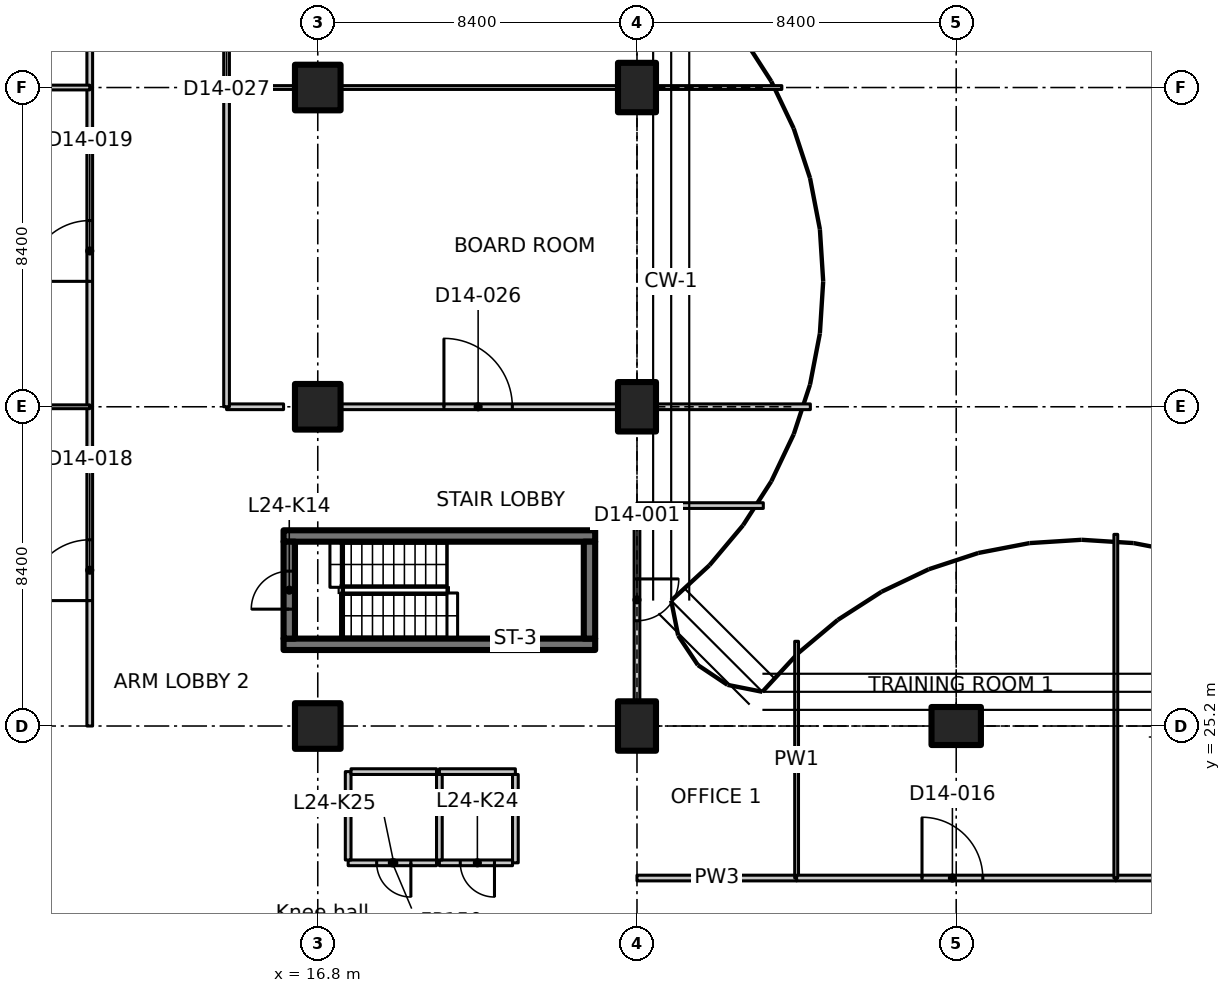
"""IFC4 building model, lengths in metres.
Left out: names, types, materials, properties, quantities, classifications, styles, units other than length and angle.
Written with IfcOpenShell. Run it as: python <this file> out.ifc"""

import sys

from ifc_helpers import new_model, si_unit, direction, frame, frame_2d, origin, origin_2d, place, context, subcontext, project, spatial, polyline, rectangle, outline, extrude, element, fill, save


model = new_model("IFC4")
c1 = context("Model", 3, precision=1e-05, world=origin(), true_north=direction((0.0, 1.0)))
c2 = subcontext(c1, "Body", "Model", "MODEL_VIEW")
j1 = project(units=[si_unit("LENGTHUNIT", "METRE"), si_unit("PLANEANGLEUNIT", "RADIAN")], contexts=[c1])
p1 = place(None, origin())
s1 = spatial("IfcSite", under=j1, at=p1, CompositionType="ELEMENT")
p2 = place(p1, origin())
s2 = spatial("IfcBuilding", under=s1, at=p2, CompositionType="ELEMENT")
p3 = place(p2, frame((0.0, 0.0, 102.5)))
s3 = spatial("IfcBuildingStorey", under=s2, at=p3, CompositionType="ELEMENT", Elevation=102.5)
for number, where, z_axis, x_axis in (
    (1, (16.8, 25.2, 0.0), (0.0, 0.0, 1.0), (1.0, 0.0, 0.0)),
    (2, (16.8, 33.6, 0.0), (0.0, 0.0, 1.0), (1.0, 0.0, 0.0)),
    (3, (16.8, 42.0, 0.0), (0.0, 0.0, 1.0), (1.0, 0.0, 0.0)),
):
    element("IfcColumn", number, at=place(p3, frame(where, z_axis=z_axis, x_axis=x_axis)), inside=s3, PredefinedType="COLUMN", context=c2, shape_type="SweptSolid", body=[
        extrude(rectangle(XDim=1.2, YDim=1.2, at=origin_2d()), origin(), (0.0, 0.0, 1.0), 3.35),
    ])
for number, where, z_axis, x_axis in (
    (4, (25.2, 25.2, 0.0), (0.0, 0.0, 1.0), (1.0, 0.0, 0.0)),
    (5, (25.2, 33.6, 0.0), (0.0, 0.0, 1.0), (1.0, 0.0, 0.0)),
    (6, (25.2, 42.0, 0.0), (0.0, 0.0, 1.0), (1.0, 0.0, 0.0)),
    (7, (33.6, 25.2, 0.0), (0.0, 0.0, 1.0), (0.0, 1.0, 0.0)),
):
    element("IfcColumn", number, at=place(p3, frame(where, z_axis=z_axis, x_axis=x_axis)), inside=s3, PredefinedType="COLUMN", context=c2, shape_type="SweptSolid", body=[
        extrude(rectangle(XDim=1.0, YDim=1.3, at=origin_2d()), origin(), (0.0, 0.0, 1.0), 3.35),
    ])
for number, where, z_axis, x_axis in (
    (8, (15.9, 27.35, 0.0), (0.0, 0.0, 1.0), (1.0, 0.0, 0.0)),
    (9, (15.9, 30.2, 0.0), (0.0, 0.0, 1.0), (1.0, 0.0, 0.0)),
):
    element("IfcWall", number, at=place(p3, frame(where, z_axis=z_axis, x_axis=x_axis)), inside=s3, PredefinedType="SHEAR", context=c2, shape_type="SweptSolid", body=[
        extrude(rectangle(XDim=8.2, YDim=0.3, at=frame_2d((4.1, 0.0))), origin(), (0.0, 0.0, 1.0), 3.35),
    ])
p4 = place(p3, frame((16.05, 27.5, 0.0), z_axis=(0.0, 0.0, 1.0), x_axis=(0.0, 1.0, 0.0)))
e10 = element("IfcWall", 10, at=p4, inside=s3, PredefinedType="SHEAR", context=c2, shape_type="SweptSolid", body=[
    extrude(rectangle(XDim=2.55, YDim=0.3, at=frame_2d((1.275, 0.0))), origin(), (0.0, 0.0, 1.0), 3.35),
])
p5 = place(p4, frame((0.775, 0.0, 0.0)))
e11 = element("IfcOpeningElement", 11, at=p5, cuts=e10, PredefinedType="OPENING", context=c2, shape_type="SweptSolid", body=[
    extrude(rectangle(XDim=1.0, YDim=2.1, at=frame_2d((0.5, 1.05))), frame((0.0, 0.16, 0.0), z_axis=(0.0, -1.0, 0.0), x_axis=(1.0, 0.0, 0.0)), (0.0, 0.0, 1.0), 0.32),
])
p6 = place(p3, frame((23.95, 27.5, 0.0), z_axis=(0.0, 0.0, 1.0), x_axis=(0.0, 1.0, 0.0)))
e12 = element("IfcWall", 12, at=p6, inside=s3, PredefinedType="SHEAR", context=c2, shape_type="SweptSolid", body=[
    extrude(rectangle(XDim=2.55, YDim=0.3, at=frame_2d((1.275, 0.0))), origin(), (0.0, 0.0, 1.0), 3.35),
])
p7 = place(p3, frame((20.0, 24.0, 0.0), z_axis=(0.0, 0.0, 1.0), x_axis=(1.0, 0.0, 0.0)))
e13 = element("IfcWall", 13, at=p7, inside=s3, PredefinedType="PARTITIONING", context=c2, shape_type="SweptSolid", body=[
    extrude(rectangle(XDim=2.0, YDim=0.15, at=frame_2d((1.0, 0.0))), origin(), (0.0, 0.0, 1.0), 3.35),
])
p8 = place(p3, frame((22.0, 23.925, 0.0), z_axis=(0.0, 0.0, 1.0), x_axis=(0.0, -1.0, 0.0)))
e14 = element("IfcWall", 14, at=p8, inside=s3, PredefinedType="PARTITIONING", context=c2, shape_type="SweptSolid", body=[
    extrude(rectangle(XDim=2.325, YDim=0.15, at=frame_2d((1.163, 0.0))), origin(), (0.0, 0.0, 1.0), 3.35),
])
p9 = place(p3, frame((21.925, 21.6, 0.0), z_axis=(0.0, 0.0, 1.0), x_axis=(-1.0, 0.0, 0.0)))
e15 = element("IfcWall", 15, at=p9, inside=s3, PredefinedType="PARTITIONING", context=c2, shape_type="SweptSolid", body=[
    extrude(rectangle(XDim=1.925, YDim=0.15, at=frame_2d((0.962, 0.0))), origin(), (0.0, 0.0, 1.0), 3.35),
])
p10 = place(p9, frame((0.475, 0.0, 0.0)))
e16 = element("IfcOpeningElement", 16, at=p10, cuts=e15, PredefinedType="OPENING", context=c2, shape_type="SweptSolid", body=[
    extrude(rectangle(XDim=0.9, YDim=2.1, at=frame_2d((0.45, 1.05))), frame((0.0, 0.085, 0.0), z_axis=(0.0, -1.0, 0.0), x_axis=(1.0, 0.0, 0.0)), (0.0, 0.0, 1.0), 0.17),
])
p11 = place(p3, frame((20.0, 21.675, 0.0), z_axis=(0.0, 0.0, 1.0), x_axis=(0.0, 1.0, 0.0)))
e17 = element("IfcWall", 17, at=p11, inside=s3, PredefinedType="PARTITIONING", context=c2, shape_type="SweptSolid", body=[
    extrude(rectangle(XDim=2.25, YDim=0.15, at=frame_2d((1.125, 0.0))), origin(), (0.0, 0.0, 1.0), 3.35),
])
p12 = place(p3, frame((19.925, 21.6, 0.0), z_axis=(0.0, 0.0, 1.0), x_axis=(-1.0, 0.0, 0.0)))
e18 = element("IfcWall", 18, at=p12, inside=s3, PredefinedType="PARTITIONING", context=c2, shape_type="SweptSolid", body=[
    extrude(rectangle(XDim=2.325, YDim=0.15, at=frame_2d((1.163, 0.0))), origin(), (0.0, 0.0, 1.0), 3.35),
])
p13 = place(p12, frame((0.675, 0.0, 0.0)))
e19 = element("IfcOpeningElement", 19, at=p13, cuts=e18, PredefinedType="OPENING", context=c2, shape_type="SweptSolid", body=[
    extrude(rectangle(XDim=0.9, YDim=2.1, at=frame_2d((0.45, 1.05))), frame((0.0, 0.085, 0.0), z_axis=(0.0, -1.0, 0.0), x_axis=(1.0, 0.0, 0.0)), (0.0, 0.0, 1.0), 0.17),
])
p14 = place(p3, frame((17.6, 21.675, 0.0), z_axis=(0.0, 0.0, 1.0), x_axis=(0.0, 1.0, 0.0)))
e20 = element("IfcWall", 20, at=p14, inside=s3, PredefinedType="PARTITIONING", context=c2, shape_type="SweptSolid", body=[
    extrude(rectangle(XDim=2.325, YDim=0.15, at=frame_2d((1.163, 0.0))), origin(), (0.0, 0.0, 1.0), 3.35),
])
p15 = place(p3, frame((17.675, 24.0, 0.0), z_axis=(0.0, 0.0, 1.0), x_axis=(1.0, 0.0, 0.0)))
e21 = element("IfcWall", 21, at=p15, inside=s3, PredefinedType="PARTITIONING", context=c2, shape_type="SweptSolid", body=[
    extrude(rectangle(XDim=2.25, YDim=0.15, at=frame_2d((1.125, 0.0))), origin(), (0.0, 0.0, 1.0), 3.35),
])
p16 = place(p3, frame((25.2, 21.2, 0.0), z_axis=(0.0, 0.0, 1.0), x_axis=(1.0, 0.0, 0.0)))
e22 = element("IfcWall", 22, at=p16, inside=s3, PredefinedType="PARTITIONING", context=c2, shape_type="SweptSolid", body=[
    extrude(rectangle(XDim=4.2, YDim=0.15, at=frame_2d((2.1, 0.0))), origin(), (0.0, 0.0, 1.0), 3.33),
])
p17 = place(p3, frame((29.4, 27.429, 0.0), z_axis=(0.0, 0.0, 1.0), x_axis=(0.0, -1.0, 0.0)))
e23 = element("IfcWall", 23, at=p17, inside=s3, PredefinedType="PARTITIONING", context=c2, shape_type="SweptSolid", body=[
    extrude(outline(polyline([(0.0, 0.0), (6.229, 0.0), (6.229, 3.33), (2.679, 3.33), (2.677, 2.98), (1.781, 2.98), (1.779, 3.33), (0.154, 3.33), (0.0, 3.33), (0.0, 0.0)])), frame((0.0, 0.05, 0.0), z_axis=(0.0, -1.0, 0.0), x_axis=(1.0, 0.0, 0.0)), (0.0, 0.0, 1.0), 0.1),
])
p18 = place(p3, frame((25.2, 31.0, 0.0), z_axis=(0.0, 0.0, 1.0), x_axis=(0.0, -1.0, 0.0)))
e24 = element("IfcWall", 24, at=p18, inside=s3, PredefinedType="PARTITIONING", context=c2, shape_type="SweptSolid", body=[
    extrude(outline(polyline([(0.0, 0.0), (5.13, 0.0), (5.13, 2.98), (0.0, 2.98), (0.0, 0.0)])), frame((0.0, 0.075, 0.0), z_axis=(0.0, -1.0, 0.0), x_axis=(1.0, 0.0, 0.0)), (0.0, 0.0, 1.0), 0.15),
])
p19 = place(p18, frame((1.93, 0.0, 0.0)))
e25 = element("IfcOpeningElement", 25, at=p19, cuts=e24, PredefinedType="OPENING", context=c2, shape_type="SweptSolid", body=[
    extrude(rectangle(XDim=1.1, YDim=2.1, at=frame_2d((0.55, 1.05))), frame((0.0, 0.085, 0.0), z_axis=(0.0, -1.0, 0.0), x_axis=(1.0, 0.0, 0.0)), (0.0, 0.0, 1.0), 0.17),
])
p20 = place(p3, frame((25.2, 31.0, 0.0), z_axis=(0.0, 0.0, 1.0), x_axis=(1.0, 0.0, 0.0)))
e26 = element("IfcWall", 26, at=p20, inside=s3, PredefinedType="PARTITIONING", context=c2, shape_type="SweptSolid", body=[
    extrude(rectangle(XDim=3.324, YDim=0.15, at=frame_2d((1.662, 0.0))), origin(), (0.0, 0.0, 1.0), 2.98),
])
p21 = place(p3, frame((29.4, 21.2, 0.0), z_axis=(0.0, 0.0, 1.0), x_axis=(1.0, 0.0, 0.0)))
e27 = element("IfcWall", 27, at=p21, inside=s3, PredefinedType="PARTITIONING", context=c2, shape_type="SweptSolid", body=[
    extrude(rectangle(XDim=8.4, YDim=0.15, at=frame_2d((4.2, 0.0))), origin(), (0.0, 0.0, 1.0), 3.33),
])
p22 = place(p21, frame((3.3, 0.0, 0.0)))
e28 = element("IfcOpeningElement", 28, at=p22, cuts=e27, PredefinedType="OPENING", context=c2, shape_type="SweptSolid", body=[
    extrude(rectangle(XDim=1.6, YDim=2.1, at=frame_2d((0.8, 1.05))), frame((0.0, 0.085, 0.0), z_axis=(0.0, -1.0, 0.0), x_axis=(1.0, 0.0, 0.0)), (0.0, 0.0, 1.0), 0.17),
])
p23 = place(p3, frame((37.8, 21.2, 0.0), z_axis=(0.0, 0.0, 1.0), x_axis=(1.0, 0.0, 0.0)))
e29 = element("IfcWall", 29, at=p23, inside=s3, PredefinedType="PARTITIONING", context=c2, shape_type="SweptSolid", body=[
    extrude(rectangle(XDim=13.2, YDim=0.15, at=frame_2d((6.6, 0.0))), origin(), (0.0, 0.0, 1.0), 3.33),
])
p24 = place(p23, frame((5.7, 0.0, 0.0)))
e30 = element("IfcOpeningElement", 30, at=p24, cuts=e29, PredefinedType="OPENING", context=c2, shape_type="SweptSolid", body=[
    extrude(rectangle(XDim=2.0, YDim=2.4, at=frame_2d((1.0, 1.2))), frame((0.0, 0.085, 0.0), z_axis=(0.0, -1.0, 0.0), x_axis=(1.0, 0.0, 0.0)), (0.0, 0.0, 1.0), 0.17),
])
p25 = place(p3, frame((37.8, 30.243, 0.0), z_axis=(0.0, 0.0, 1.0), x_axis=(0.0, -1.0, 0.0)))
e31 = element("IfcWall", 31, at=p25, inside=s3, PredefinedType="PARTITIONING", context=c2, shape_type="SweptSolid", body=[
    extrude(outline(polyline([(0.0, 0.0), (9.043, 0.0), (9.043, 3.33), (5.493, 3.33), (5.491, 2.98), (4.595, 2.98), (4.593, 3.33), (0.0, 3.33), (0.0, 0.0)])), frame((0.0, 0.05, 0.0), z_axis=(0.0, -1.0, 0.0), x_axis=(1.0, 0.0, 0.0)), (0.0, 0.0, 1.0), 0.1),
])
p26 = place(p3, frame((10.8, 25.2, 0.0), z_axis=(0.0, 0.0, 1.0), x_axis=(0.0, 1.0, 0.0)))
e32 = element("IfcWall", 32, at=p26, inside=s3, PredefinedType="PARTITIONING", context=c2, shape_type="SweptSolid", body=[
    extrude(rectangle(XDim=8.4, YDim=0.15, at=frame_2d((4.2, 0.0))), origin(), (0.0, 0.0, 1.0), 3.33),
])
p27 = place(p26, frame((3.3, 0.0, 0.0)))
e33 = element("IfcOpeningElement", 33, at=p27, cuts=e32, PredefinedType="OPENING", context=c2, shape_type="SweptSolid", body=[
    extrude(rectangle(XDim=1.6, YDim=2.1, at=frame_2d((0.8, 1.05))), frame((0.0, 0.085, 0.0), z_axis=(0.0, -1.0, 0.0), x_axis=(1.0, 0.0, 0.0)), (0.0, 0.0, 1.0), 0.17),
])
p28 = place(p3, frame((14.4, 33.6, 0.0), z_axis=(0.0, 0.0, 1.0), x_axis=(1.0, 0.0, 0.0)))
e34 = element("IfcWall", 34, at=p28, inside=s3, PredefinedType="PARTITIONING", context=c2, shape_type="SweptSolid", body=[
    extrude(rectangle(XDim=1.5, YDim=0.15, at=frame_2d((0.75, 0.0))), origin(), (0.0, 0.0, 1.0), 3.33),
])
p29 = place(p3, frame((17.42, 33.6, 0.0), z_axis=(0.0, 0.0, 1.0), x_axis=(1.0, 0.0, 0.0)))
e35 = element("IfcWall", 35, at=p29, inside=s3, PredefinedType="PARTITIONING", context=c2, shape_type="SweptSolid", body=[
    extrude(rectangle(XDim=7.26, YDim=0.15, at=frame_2d((3.63, 0.0))), origin(), (0.0, 0.0, 1.0), 3.33),
])
p30 = place(p29, frame((2.7, 0.0, 0.0)))
e36 = element("IfcOpeningElement", 36, at=p30, cuts=e35, PredefinedType="OPENING", context=c2, shape_type="SweptSolid", body=[
    extrude(rectangle(XDim=1.8, YDim=2.1, at=frame_2d((0.9, 1.05))), frame((0.0, 0.085, 0.0), z_axis=(0.0, -1.0, 0.0), x_axis=(1.0, 0.0, 0.0)), (0.0, 0.0, 1.0), 0.17),
])
p31 = place(p3, frame((25.72, 33.6, 0.0), z_axis=(0.0, 0.0, 1.0), x_axis=(1.0, 0.0, 0.0)))
e37 = element("IfcWall", 37, at=p31, inside=s3, PredefinedType="PARTITIONING", context=c2, shape_type="SweptSolid", body=[
    extrude(rectangle(XDim=4.042, YDim=0.15, at=frame_2d((2.021, 0.0))), origin(), (0.0, 0.0, 1.0), 2.98),
])
p32 = place(p3, frame((10.8, 33.6, 0.0), z_axis=(0.0, 0.0, 1.0), x_axis=(0.0, 1.0, 0.0)))
e38 = element("IfcWall", 38, at=p32, inside=s3, PredefinedType="PARTITIONING", context=c2, shape_type="SweptSolid", body=[
    extrude(rectangle(XDim=8.4, YDim=0.15, at=frame_2d((4.2, 0.0))), origin(), (0.0, 0.0, 1.0), 3.33),
])
p33 = place(p32, frame((3.3, 0.0, 0.0)))
e39 = element("IfcOpeningElement", 39, at=p33, cuts=e38, PredefinedType="OPENING", context=c2, shape_type="SweptSolid", body=[
    extrude(rectangle(XDim=1.6, YDim=2.1, at=frame_2d((0.8, 1.05))), frame((0.0, 0.085, 0.0), z_axis=(0.0, -1.0, 0.0), x_axis=(1.0, 0.0, 0.0)), (0.0, 0.0, 1.0), 0.17),
])
p34 = place(p3, frame((10.8, 42.0, 0.0), z_axis=(0.0, 0.0, 1.0), x_axis=(0.0, 1.0, 0.0)))
e40 = element("IfcWall", 40, at=p34, inside=s3, PredefinedType="PARTITIONING", context=c2, shape_type="SweptSolid", body=[
    extrude(rectangle(XDim=4.2, YDim=0.15, at=frame_2d((2.1, 0.0))), origin(), (0.0, 0.0, 1.0), 3.33),
])
p35 = place(p3, frame((14.4, 42.0, 0.0), z_axis=(0.0, 0.0, 1.0), x_axis=(0.0, -1.0, 0.0)))
e41 = element("IfcWall", 41, at=p35, inside=s3, PredefinedType="PARTITIONING", context=c2, shape_type="SweptSolid", body=[
    extrude(rectangle(XDim=8.4, YDim=0.15, at=frame_2d((4.2, 0.0))), origin(), (0.0, 0.0, 1.0), 3.33),
])
p36 = place(p3, frame((14.4, 46.2, 0.0), z_axis=(0.0, 0.0, 1.0), x_axis=(0.0, -1.0, 0.0)))
e42 = element("IfcWall", 42, at=p36, inside=s3, PredefinedType="PARTITIONING", context=c2, shape_type="SweptSolid", body=[
    extrude(rectangle(XDim=4.2, YDim=0.15, at=frame_2d((2.1, 0.0))), origin(), (0.0, 0.0, 1.0), 3.33),
])
p37 = place(p36, frame((1.5, 0.0, 0.0)))
e43 = element("IfcOpeningElement", 43, at=p37, cuts=e42, PredefinedType="OPENING", context=c2, shape_type="SweptSolid", body=[
    extrude(rectangle(XDim=1.1, YDim=2.1, at=frame_2d((0.55, 1.05))), frame((0.0, 0.085, 0.0), z_axis=(0.0, -1.0, 0.0), x_axis=(1.0, 0.0, 0.0)), (0.0, 0.0, 1.0), 0.17),
])
p38 = place(p3, frame((9.02, 33.6, 0.0), z_axis=(0.0, 0.0, 1.0), x_axis=(1.0, 0.0, 0.0)))
e44 = element("IfcWall", 44, at=p38, inside=s3, PredefinedType="PARTITIONING", context=c2, shape_type="SweptSolid", body=[
    extrude(rectangle(XDim=1.78, YDim=0.1, at=frame_2d((0.89, 0.0))), origin(), (0.0, 0.0, 1.0), 3.33),
])
p39 = place(p3, frame((9.02, 42.0, 0.0), z_axis=(0.0, 0.0, 1.0), x_axis=(1.0, 0.0, 0.0)))
e45 = element("IfcWall", 45, at=p39, inside=s3, PredefinedType="PARTITIONING", context=c2, shape_type="SweptSolid", body=[
    extrude(rectangle(XDim=1.78, YDim=0.125, at=frame_2d((0.89, 0.0))), origin(), (0.0, 0.0, 1.0), 3.33),
])
p40 = place(p3, frame((14.4, 42.0, 0.0), z_axis=(0.0, 0.0, 1.0), x_axis=(1.0, 0.0, 0.0)))
e46 = element("IfcWall", 46, at=p40, inside=s3, PredefinedType="PARTITIONING", context=c2, shape_type="SweptSolid", body=[
    extrude(rectangle(XDim=1.78, YDim=0.1, at=frame_2d((0.89, 0.0))), origin(), (0.0, 0.0, 1.0), 3.33),
])
p41 = place(p3, frame((17.42, 42.0, 0.0), z_axis=(0.0, 0.0, 1.0), x_axis=(1.0, 0.0, 0.0)))
e47 = element("IfcWall", 47, at=p41, inside=s3, PredefinedType="PARTITIONING", context=c2, shape_type="SweptSolid", body=[
    extrude(rectangle(XDim=7.26, YDim=0.1, at=frame_2d((3.63, 0.0))), origin(), (0.0, 0.0, 1.0), 3.33),
])
p42 = place(p3, frame((25.72, 42.0, 0.0), z_axis=(0.0, 0.0, 1.0), x_axis=(1.0, 0.0, 0.0)))
e48 = element("IfcWall", 48, at=p42, inside=s3, PredefinedType="PARTITIONING", context=c2, shape_type="SweptSolid", body=[
    extrude(rectangle(XDim=3.292, YDim=0.1, at=frame_2d((1.646, 0.0))), origin(), (0.0, 0.0, 1.0), 2.98),
])
p43 = place(p5, origin())
e49 = element("IfcDoor", 49, at=p43, inside=s3, OperationType="SINGLE_SWING_RIGHT", PredefinedType="DOOR", context=c2, shape_type="SweptSolid", body=[
    extrude(rectangle(XDim=1.0, YDim=2.1, at=frame_2d((0.5, 1.05))), frame((0.0, 0.025, 0.0), z_axis=(0.0, -1.0, 0.0), x_axis=(1.0, 0.0, 0.0)), (0.0, 0.0, 1.0), 0.05),
])
fill(e11, e49)
p44 = place(p10, origin())
e50 = element("IfcDoor", 50, at=p44, inside=s3, OperationType="SINGLE_SWING_RIGHT", PredefinedType="DOOR", context=c2, shape_type="SweptSolid", body=[
    extrude(rectangle(XDim=0.9, YDim=2.1, at=frame_2d((0.45, 1.05))), frame((0.0, 0.025, 0.0), z_axis=(0.0, -1.0, 0.0), x_axis=(1.0, 0.0, 0.0)), (0.0, 0.0, 1.0), 0.05),
])
fill(e16, e50)
p45 = place(p13, origin())
e51 = element("IfcDoor", 51, at=p45, inside=s3, OperationType="SINGLE_SWING_LEFT", PredefinedType="DOOR", context=c2, shape_type="SweptSolid", body=[
    extrude(rectangle(XDim=0.9, YDim=2.1, at=frame_2d((0.45, 1.05))), frame((0.0, 0.025, 0.0), z_axis=(0.0, -1.0, 0.0), x_axis=(1.0, 0.0, 0.0)), (0.0, 0.0, 1.0), 0.05),
])
fill(e19, e51)
p46 = place(p19, origin())
e52 = element("IfcDoor", 52, at=p46, inside=s3, OperationType="SINGLE_SWING_RIGHT", PredefinedType="DOOR", context=c2, shape_type="SweptSolid", body=[
    extrude(rectangle(XDim=1.1, YDim=2.1, at=frame_2d((0.55, 1.05))), frame((0.0, 0.025, 0.0), z_axis=(0.0, -1.0, 0.0), x_axis=(1.0, 0.0, 0.0)), (0.0, 0.0, 1.0), 0.05),
])
fill(e25, e52)
p47 = place(p22, origin())
e53 = element("IfcDoor", 53, at=p47, inside=s3, OperationType="DOUBLE_DOOR_SINGLE_SWING", PredefinedType="DOOR", context=c2, shape_type="SweptSolid", body=[
    extrude(rectangle(XDim=1.6, YDim=2.1, at=frame_2d((0.8, 1.05))), frame((0.0, 0.025, 0.0), z_axis=(0.0, -1.0, 0.0), x_axis=(1.0, 0.0, 0.0)), (0.0, 0.0, 1.0), 0.05),
])
fill(e28, e53)
p48 = place(p27, origin())
e54 = element("IfcDoor", 54, at=p48, inside=s3, OperationType="DOUBLE_DOOR_SINGLE_SWING", PredefinedType="DOOR", context=c2, shape_type="SweptSolid", body=[
    extrude(rectangle(XDim=1.6, YDim=2.1, at=frame_2d((0.8, 1.05))), frame((0.0, 0.025, 0.0), z_axis=(0.0, -1.0, 0.0), x_axis=(1.0, 0.0, 0.0)), (0.0, 0.0, 1.0), 0.05),
])
fill(e33, e54)
p49 = place(p33, origin())
e55 = element("IfcDoor", 55, at=p49, inside=s3, OperationType="DOUBLE_DOOR_SINGLE_SWING", PredefinedType="DOOR", context=c2, shape_type="SweptSolid", body=[
    extrude(rectangle(XDim=1.6, YDim=2.1, at=frame_2d((0.8, 1.05))), frame((0.0, 0.025, 0.0), z_axis=(0.0, -1.0, 0.0), x_axis=(1.0, 0.0, 0.0)), (0.0, 0.0, 1.0), 0.05),
])
fill(e39, e55)
p50 = place(p30, origin())
e56 = element("IfcDoor", 56, at=p50, inside=s3, OperationType="DOUBLE_DOOR_SINGLE_SWING", PredefinedType="DOOR", context=c2, shape_type="SweptSolid", body=[
    extrude(rectangle(XDim=1.8, YDim=2.1, at=frame_2d((0.9, 1.05))), frame((0.0, 0.025, 0.0), z_axis=(0.0, -1.0, 0.0), x_axis=(1.0, 0.0, 0.0)), (0.0, 0.0, 1.0), 0.05),
])
fill(e36, e56)
save(model, sys.argv[1])
